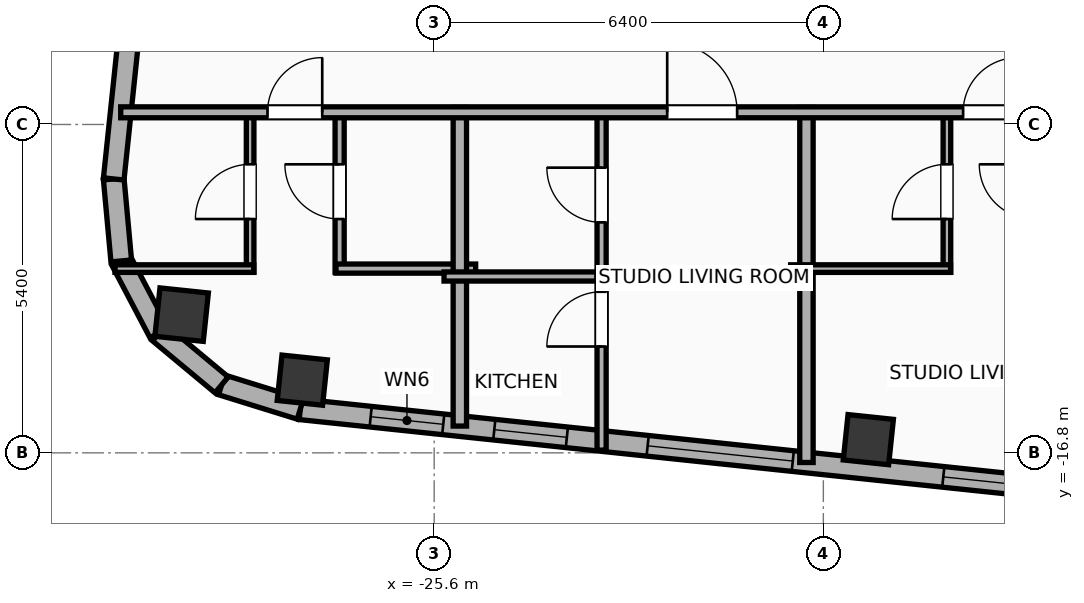
"""IFC4 building model, lengths in metres.
Left out: names, types, materials, properties, quantities, classifications, styles, units other than length and angle.
Written with IfcOpenShell. Run it as: python <this file> out.ifc"""

import sys

from ifc_helpers import new_model, si_unit, direction, frame, frame_2d, origin, origin_2d, place, context, subcontext, project, spatial, rectangle, hollow_rectangle, hollow_circle, extrude, element, fill, save


model = new_model("IFC4")
c1 = context("Model", 3, precision=1e-05, world=origin(), true_north=direction((0.0, 1.0)))
c2 = subcontext(c1, "Body", "Model", "MODEL_VIEW")
j1 = project(units=[si_unit("LENGTHUNIT", "METRE"), si_unit("PLANEANGLEUNIT", "RADIAN")], contexts=[c1])
p1 = place(None, origin())
s1 = spatial("IfcSite", under=j1, at=p1, CompositionType="ELEMENT")
p2 = place(p1, origin())
s2 = spatial("IfcBuilding", under=s1, at=p2, CompositionType="ELEMENT")
p3 = place(p2, frame((0.0, 0.0, 287.3)))
s3 = spatial("IfcBuildingStorey", under=s2, at=p3, CompositionType="ELEMENT", Elevation=287.3)
for number, where, z_axis, x_axis in (
    (1, (-27.769, -15.604, 0.0), (0.0, 0.0, 1.0), (0.995, -0.105, 0.0)),
    (2, (-18.46, -16.583, 0.0), (0.0, 0.0, 1.0), (0.995, -0.105, 0.0)),
):
    element("IfcColumn", number, at=place(p3, frame(where, z_axis=z_axis, x_axis=x_axis)), inside=s3, PredefinedType="COLUMN", context=c2, shape_type="SweptSolid", body=[
        extrude(hollow_rectangle(XDim=0.75, YDim=0.75, WallThickness=0.025, at=origin_2d()), origin(), (0.0, 0.0, 1.0), 3.9),
    ])
p4 = place(p3, frame((-29.753, -14.527, 0.0), z_axis=(0.0, 0.0, 1.0), x_axis=(0.994521895368, -0.104528463268, 0.0)))
e3 = element("IfcColumn", 3, at=p4, inside=s3, PredefinedType="COLUMN", context=c2, shape_type="SweptSolid", body=[
    extrude(hollow_circle(Radius=0.4, WallThickness=0.028, at=origin_2d()), origin(), (0.0, 0.0, 1.0), 3.9),
])
p5 = place(p3, frame((18.708, -20.972, 0.0), z_axis=(0.0, 0.0, 1.0), x_axis=(-0.994521888554, 0.104528528102, 0.0)))
e4 = element("IfcWall", 4, at=p5, inside=s3, PredefinedType="ELEMENTEDWALL", context=c2, shape_type="SweptSolid", body=[
    extrude(rectangle(XDim=46.766, YDim=0.34, at=frame_2d((23.383, 0.0))), origin(), (0.0, 0.0, 1.0), 3.635),
])
p6 = place(p5, frame((23.833, 0.0, 0.75)))
e5 = element("IfcOpeningElement", 5, at=p6, cuts=e4, PredefinedType="OPENING", context=c2, shape_type="SweptSolid", body=[
    extrude(rectangle(XDim=2.4, YDim=2.1, at=frame_2d((1.2, 1.05))), frame((0.0, 0.18, 0.0), z_axis=(0.0, -1.0, 0.0), x_axis=(1.0, 0.0, 0.0)), (0.0, 0.0, 1.0), 0.36),
])
p7 = place(p5, frame((38.622, 0.0, 0.75)))
e6 = element("IfcOpeningElement", 6, at=p7, cuts=e4, PredefinedType="OPENING", context=c2, shape_type="SweptSolid", body=[
    extrude(rectangle(XDim=2.4, YDim=2.1, at=frame_2d((1.2, 1.05))), frame((0.0, 0.18, 0.0), z_axis=(0.0, -1.0, 0.0), x_axis=(1.0, 0.0, 0.0)), (0.0, 0.0, 1.0), 0.36),
])
p8 = place(p5, frame((44.402, 0.0, 0.75)))
e7 = element("IfcOpeningElement", 7, at=p8, cuts=e4, PredefinedType="OPENING", context=c2, shape_type="SweptSolid", body=[
    extrude(rectangle(XDim=1.2, YDim=2.05, at=frame_2d((0.6, 1.025))), frame((0.0, 0.18, 0.0), z_axis=(0.0, -1.0, 0.0), x_axis=(1.0, 0.0, 0.0)), (0.0, 0.0, 1.0), 0.36),
])
p9 = place(p5, frame((42.358, 0.0, 0.75)))
e8 = element("IfcOpeningElement", 8, at=p9, cuts=e4, PredefinedType="OPENING", context=c2, shape_type="SweptSolid", body=[
    extrude(rectangle(XDim=1.2, YDim=2.05, at=frame_2d((0.6, 1.025))), frame((0.0, 0.18, 0.0), z_axis=(0.0, -1.0, 0.0), x_axis=(1.0, 0.0, 0.0)), (0.0, 0.0, 1.0), 0.36),
])
p10 = place(p5, frame((34.933, 0.0, 0.75)))
e9 = element("IfcOpeningElement", 9, at=p10, cuts=e4, PredefinedType="OPENING", context=c2, shape_type="SweptSolid", body=[
    extrude(rectangle(XDim=1.2, YDim=2.05, at=frame_2d((0.6, 1.025))), frame((0.0, 0.18, 0.0), z_axis=(0.0, -1.0, 0.0), x_axis=(1.0, 0.0, 0.0)), (0.0, 0.0, 1.0), 0.36),
])
p11 = place(p5, frame((28.704, 0.0, 0.75)))
e10 = element("IfcOpeningElement", 10, at=p11, cuts=e4, PredefinedType="OPENING", context=c2, shape_type="SweptSolid", body=[
    extrude(rectangle(XDim=1.2, YDim=2.05, at=frame_2d((0.6, 1.025))), frame((0.0, 0.18, 0.0), z_axis=(0.0, -1.0, 0.0), x_axis=(1.0, 0.0, 0.0)), (0.0, 0.0, 1.0), 0.36),
])
p12 = place(p5, frame((30.849, 0.0, 0.75)))
e11 = element("IfcOpeningElement", 11, at=p12, cuts=e4, PredefinedType="OPENING", context=c2, shape_type="SweptSolid", body=[
    extrude(rectangle(XDim=1.2, YDim=2.05, at=frame_2d((0.6, 1.025))), frame((0.0, 0.18, 0.0), z_axis=(0.0, -1.0, 0.0), x_axis=(1.0, 0.0, 0.0)), (0.0, 0.0, 1.0), 0.36),
])
p13 = place(p5, frame((7.479, 0.0, 0.75)))
e12 = element("IfcOpeningElement", 12, at=p13, cuts=e4, PredefinedType="OPENING", context=c2, shape_type="SweptSolid", body=[
    extrude(rectangle(XDim=1.2, YDim=2.05, at=frame_2d((0.6, 1.025))), frame((0.0, 0.18, 0.0), z_axis=(0.0, -1.0, 0.0), x_axis=(1.0, 0.0, 0.0)), (0.0, 0.0, 1.0), 0.36),
])
p14 = place(p5, frame((3.796, 0.0, 0.75)))
e13 = element("IfcOpeningElement", 13, at=p14, cuts=e4, PredefinedType="OPENING", context=c2, shape_type="SweptSolid", body=[
    extrude(rectangle(XDim=1.2, YDim=2.05, at=frame_2d((0.6, 1.025))), frame((0.0, 0.18, 0.0), z_axis=(0.0, -1.0, 0.0), x_axis=(1.0, 0.0, 0.0)), (0.0, 0.0, 1.0), 0.36),
])
p15 = place(p5, frame((1.388, 0.0, 0.75)))
e14 = element("IfcOpeningElement", 14, at=p15, cuts=e4, PredefinedType="OPENING", context=c2, shape_type="SweptSolid", body=[
    extrude(rectangle(XDim=1.2, YDim=2.05, at=frame_2d((0.6, 1.025))), frame((0.0, 0.18, 0.0), z_axis=(0.0, -1.0, 0.0), x_axis=(1.0, 0.0, 0.0)), (0.0, 0.0, 1.0), 0.36),
])
p16 = place(p5, frame((20.254, 0.0, 0.75)))
e15 = element("IfcOpeningElement", 15, at=p16, cuts=e4, PredefinedType="OPENING", context=c2, shape_type="SweptSolid", body=[
    extrude(rectangle(XDim=1.2, YDim=2.05, at=frame_2d((0.6, 1.025))), frame((0.0, 0.18, 0.0), z_axis=(0.0, -1.0, 0.0), x_axis=(1.0, 0.0, 0.0)), (0.0, 0.0, 1.0), 0.36),
])
p17 = place(p5, frame((16.172, 0.0, 0.75)))
e16 = element("IfcOpeningElement", 16, at=p17, cuts=e4, PredefinedType="OPENING", context=c2, shape_type="SweptSolid", body=[
    extrude(rectangle(XDim=1.2, YDim=2.05, at=frame_2d((0.6, 1.025))), frame((0.0, 0.18, 0.0), z_axis=(0.0, -1.0, 0.0), x_axis=(1.0, 0.0, 0.0)), (0.0, 0.0, 1.0), 0.36),
])
p18 = place(p5, frame((12.11, 0.0, 0.75)))
e17 = element("IfcOpeningElement", 17, at=p18, cuts=e4, PredefinedType="OPENING", context=c2, shape_type="SweptSolid", body=[
    extrude(rectangle(XDim=1.2, YDim=2.05, at=frame_2d((0.6, 1.025))), frame((0.0, 0.18, 0.0), z_axis=(0.0, -1.0, 0.0), x_axis=(1.0, 0.0, 0.0)), (0.0, 0.0, 1.0), 0.36),
])
p19 = place(p3, frame((-27.802, -16.084, 0.0), z_axis=(0.0, 0.0, 1.0), x_axis=(-0.955007802701, 0.296580674994, 0.0)))
e18 = element("IfcWall", 18, at=p19, inside=s3, PredefinedType="ELEMENTEDWALL", context=c2, shape_type="SweptSolid", body=[
    extrude(rectangle(XDim=1.354, YDim=0.34, at=frame_2d((0.677, 0.0))), origin(), (0.0, 0.0, 1.0), 3.635),
])
p20 = place(p3, frame((-29.096, -15.682, 0.0), z_axis=(0.0, 0.0, 1.0), x_axis=(-0.768864427906, 0.639411832469, 0.0)))
e19 = element("IfcWall", 19, at=p20, inside=s3, PredefinedType="ELEMENTEDWALL", context=c2, shape_type="SweptSolid", body=[
    extrude(rectangle(XDim=1.337, YDim=0.34, at=frame_2d((0.668, 0.0))), origin(), (0.0, 0.0, 1.0), 3.635),
])
p21 = place(p3, frame((-30.124, -14.827, 0.0), z_axis=(0.0, 0.0, 1.0), x_axis=(-0.465528132217, 0.885033083062, 0.0)))
e20 = element("IfcWall", 20, at=p21, inside=s3, PredefinedType="ELEMENTEDWALL", context=c2, shape_type="SweptSolid", body=[
    extrude(rectangle(XDim=1.337, YDim=0.34, at=frame_2d((0.668, 0.0))), origin(), (0.0, 0.0, 1.0), 3.635),
])
p22 = place(p3, frame((-30.746, -13.644, 0.0), z_axis=(0.0, 0.0, 1.0), x_axis=(-0.091592370975, 0.995796584438, 0.0)))
e21 = element("IfcWall", 21, at=p22, inside=s3, PredefinedType="ELEMENTEDWALL", context=c2, shape_type="SweptSolid", body=[
    extrude(rectangle(XDim=1.354, YDim=0.34, at=frame_2d((0.677, 0.0))), origin(), (0.0, 0.0, 1.0), 3.635),
])
p23 = place(p3, frame((-30.87, -12.296, 0.0), z_axis=(0.0, 0.0, 1.0), x_axis=(0.104533282919, 0.994521388791, 0.0)))
e22 = element("IfcWall", 22, at=p23, inside=s3, PredefinedType="ELEMENTEDWALL", context=c2, shape_type="SweptSolid", body=[
    extrude(rectangle(XDim=30.366, YDim=0.34, at=frame_2d((15.183, 0.0))), origin(), (0.0, 0.0, 1.0), 3.635),
])
p24 = place(p23, frame((5.842, 0.0, 0.75)))
e23 = element("IfcOpeningElement", 23, at=p24, cuts=e22, PredefinedType="OPENING", context=c2, shape_type="SweptSolid", body=[
    extrude(rectangle(XDim=1.8, YDim=2.1, at=frame_2d((0.9, 1.05))), frame((0.0, 0.18, 0.0), z_axis=(0.0, -1.0, 0.0), x_axis=(1.0, 0.0, 0.0)), (0.0, 0.0, 1.0), 0.36),
])
p25 = place(p23, frame((27.238, 0.0, 0.75)))
e24 = element("IfcOpeningElement", 24, at=p25, cuts=e22, PredefinedType="OPENING", context=c2, shape_type="SweptSolid", body=[
    extrude(rectangle(XDim=1.2, YDim=2.05, at=frame_2d((0.6, 1.025))), frame((0.0, 0.18, 0.0), z_axis=(0.0, -1.0, 0.0), x_axis=(1.0, 0.0, 0.0)), (0.0, 0.0, 1.0), 0.36),
])
p26 = place(p23, frame((16.688, 0.0, 0.75)))
e25 = element("IfcOpeningElement", 25, at=p26, cuts=e22, PredefinedType="OPENING", context=c2, shape_type="SweptSolid", body=[
    extrude(rectangle(XDim=1.2, YDim=2.05, at=frame_2d((0.6, 1.025))), frame((0.0, 0.18, 0.0), z_axis=(0.0, -1.0, 0.0), x_axis=(1.0, 0.0, 0.0)), (0.0, 0.0, 1.0), 0.36),
])
p27 = place(p3, frame((-28.627, -13.83, 0.0), z_axis=(0.0, 0.0, 1.0), x_axis=(0.0, 1.0, 0.0)))
e26 = element("IfcWall", 26, at=p27, inside=s3, PredefinedType="PARTITIONING", context=c2, shape_type="SweptSolid", body=[
    extrude(rectangle(XDim=2.65, YDim=0.125, at=frame_2d((1.325, 0.0))), origin(), (0.0, 0.0, 1.0), 3.635),
])
p28 = place(p27, frame((0.875, 0.0, 0.0)))
e27 = element("IfcOpeningElement", 27, at=p28, cuts=e26, PredefinedType="OPENING", context=c2, shape_type="SweptSolid", body=[
    extrude(rectangle(XDim=0.9, YDim=2.05, at=frame_2d((0.45, 1.025))), frame((0.0, 0.073, 0.0), z_axis=(0.0, -1.0, 0.0), x_axis=(1.0, 0.0, 0.0)), (0.0, 0.0, 1.0), 0.145),
])
p29 = place(p3, frame((-27.155, -13.83, 0.0), z_axis=(0.0, 0.0, 1.0), x_axis=(0.0, 1.0, 0.0)))
e28 = element("IfcWall", 28, at=p29, inside=s3, PredefinedType="PLUMBINGWALL", context=c2, shape_type="SweptSolid", body=[
    extrude(rectangle(XDim=2.65, YDim=0.15, at=frame_2d((1.325, 0.0))), origin(), (0.0, 0.0, 1.0), 3.635),
])
p30 = place(p29, frame((0.875, 0.0, 0.0)))
e29 = element("IfcOpeningElement", 29, at=p30, cuts=e28, PredefinedType="OPENING", context=c2, shape_type="SweptSolid", body=[
    extrude(rectangle(XDim=0.9, YDim=2.05, at=frame_2d((0.45, 1.025))), frame((0.0, 0.085, 0.0), z_axis=(0.0, -1.0, 0.0), x_axis=(1.0, 0.0, 0.0)), (0.0, 0.0, 1.0), 0.17),
])
p31 = place(p3, frame((-30.849, -13.77, 0.0), z_axis=(0.0, 0.0, 1.0), x_axis=(1.0, 0.0, 0.0)))
e30 = element("IfcWall", 30, at=p31, inside=s3, PredefinedType="PARTITIONING", context=c2, shape_type="SweptSolid", body=[
    extrude(rectangle(XDim=2.282, YDim=0.125, at=frame_2d((1.141, 0.0))), origin(), (0.0, 0.0, 1.0), 3.635),
])
p32 = place(p3, frame((-27.215, -13.77, 0.0), z_axis=(0.0, 0.0, 1.0), x_axis=(1.0, 0.0, 0.0)))
e31 = element("IfcWall", 31, at=p32, inside=s3, PredefinedType="PLUMBINGWALL", context=c2, shape_type="SweptSolid", body=[
    extrude(rectangle(XDim=2.297, YDim=0.15, at=frame_2d((1.148, 0.0))), origin(), (0.0, 0.0, 1.0), 3.635),
])
p33 = place(p3, frame((-25.178, -16.36, 0.0), z_axis=(0.0, 0.0, 1.0), x_axis=(0.0, 1.0, 0.0)))
e32 = element("IfcWall", 32, at=p33, inside=s3, PredefinedType="PARTITIONING", context=c2, shape_type="SweptSolid", body=[
    extrude(rectangle(XDim=5.24, YDim=0.22, at=frame_2d((2.62, 0.0))), origin(), (0.0, 0.0, 1.0), 3.635),
])
p34 = place(p3, frame((-25.438, -13.9, 0.0), z_axis=(0.0, 0.0, 1.0), x_axis=(1.0, 0.0, 0.0)))
e33 = element("IfcWall", 33, at=p34, inside=s3, PredefinedType="PLUMBINGWALL", context=c2, shape_type="SweptSolid", body=[
    extrude(rectangle(XDim=2.671, YDim=0.15, at=frame_2d((1.335, 0.0))), origin(), (0.0, 0.0, 1.0), 3.635),
])
p35 = place(p3, frame((-22.847, -16.755, 0.0), z_axis=(0.0, 0.0, 1.0), x_axis=(0.0, 1.0, 0.0)))
e34 = element("IfcWall", 34, at=p35, inside=s3, PredefinedType="PLUMBINGWALL", context=c2, shape_type="SweptSolid", body=[
    extrude(rectangle(XDim=2.895, YDim=0.15, at=frame_2d((1.448, 0.0))), origin(), (0.0, 0.0, 1.0), 3.635),
])
p36 = place(p35, frame((1.704, 0.0, 0.0)))
e35 = element("IfcOpeningElement", 35, at=p36, cuts=e34, PredefinedType="OPENING", context=c2, shape_type="SweptSolid", body=[
    extrude(rectangle(XDim=0.9, YDim=2.05, at=frame_2d((0.45, 1.025))), frame((0.0, 0.085, 0.0), z_axis=(0.0, -1.0, 0.0), x_axis=(1.0, 0.0, 0.0)), (0.0, 0.0, 1.0), 0.17),
])
p37 = place(p3, frame((-22.847, -13.94, 0.0), z_axis=(0.0, 0.0, 1.0), x_axis=(0.0, 1.0, 0.0)))
e36 = element("IfcWall", 36, at=p37, inside=s3, PredefinedType="PLUMBINGWALL", context=c2, shape_type="SweptSolid", body=[
    extrude(rectangle(XDim=2.76, YDim=0.15, at=frame_2d((1.38, 0.0))), origin(), (0.0, 0.0, 1.0), 3.635),
])
p38 = place(p37, frame((0.93, 0.0, 0.0)))
e37 = element("IfcOpeningElement", 37, at=p38, cuts=e36, PredefinedType="OPENING", context=c2, shape_type="SweptSolid", body=[
    extrude(rectangle(XDim=0.9, YDim=2.05, at=frame_2d((0.45, 1.025))), frame((0.0, 0.085, 0.0), z_axis=(0.0, -1.0, 0.0), x_axis=(1.0, 0.0, 0.0)), (0.0, 0.0, 1.0), 0.17),
])
p39 = place(p3, frame((-19.478, -16.959, 0.0), z_axis=(0.0, 0.0, 1.0), x_axis=(0.0, 1.0, 0.0)))
e38 = element("IfcWall", 38, at=p39, inside=s3, PredefinedType="PARTITIONING", context=c2, shape_type="SweptSolid", body=[
    extrude(rectangle(XDim=5.839, YDim=0.22, at=frame_2d((2.919, 0.0))), origin(), (0.0, 0.0, 1.0), 3.635),
])
p40 = place(p3, frame((-17.168, -13.83, 0.0), z_axis=(0.0, 0.0, 1.0), x_axis=(0.0, 1.0, 0.0)))
e39 = element("IfcWall", 39, at=p40, inside=s3, PredefinedType="PARTITIONING", context=c2, shape_type="SweptSolid", body=[
    extrude(rectangle(XDim=2.65, YDim=0.125, at=frame_2d((1.325, 0.0))), origin(), (0.0, 0.0, 1.0), 3.635),
])
p41 = place(p40, frame((0.875, 0.0, 0.0)))
e40 = element("IfcOpeningElement", 40, at=p41, cuts=e39, PredefinedType="OPENING", context=c2, shape_type="SweptSolid", body=[
    extrude(rectangle(XDim=0.9, YDim=2.05, at=frame_2d((0.45, 1.025))), frame((0.0, 0.073, 0.0), z_axis=(0.0, -1.0, 0.0), x_axis=(1.0, 0.0, 0.0)), (0.0, 0.0, 1.0), 0.145),
])
p42 = place(p3, frame((-19.738, -13.77, 0.0), z_axis=(0.0, 0.0, 1.0), x_axis=(1.0, 0.0, 0.0)))
e41 = element("IfcWall", 41, at=p42, inside=s3, PredefinedType="PARTITIONING", context=c2, shape_type="SweptSolid", body=[
    extrude(rectangle(XDim=2.63, YDim=0.125, at=frame_2d((1.315, 0.0))), origin(), (0.0, 0.0, 1.0), 3.635),
])
p43 = place(p3, frame((-30.755, -11.2, 0.0), z_axis=(0.0, 0.0, 1.0), x_axis=(1.0, 0.0, 0.0)))
e42 = element("IfcWall", 42, at=p43, inside=s3, PredefinedType="PARTITIONING", context=c2, shape_type="SweptSolid", body=[
    extrude(rectangle(XDim=22.675, YDim=0.18, at=frame_2d((11.337, 0.0))), origin(), (0.0, 0.0, 1.0), 3.635),
])
p44 = place(p43, frame((2.414, 0.0, 0.0)))
e43 = element("IfcOpeningElement", 43, at=p44, cuts=e42, PredefinedType="OPENING", context=c2, shape_type="SweptSolid", body=[
    extrude(rectangle(XDim=0.9, YDim=2.05, at=frame_2d((0.45, 1.025))), frame((0.0, 0.1, 0.0), z_axis=(0.0, -1.0, 0.0), x_axis=(1.0, 0.0, 0.0)), (0.0, 0.0, 1.0), 0.2),
])
p45 = place(p43, frame((8.987, 0.0, 0.0)))
e44 = element("IfcOpeningElement", 44, at=p45, cuts=e42, PredefinedType="OPENING", context=c2, shape_type="SweptSolid", body=[
    extrude(rectangle(XDim=1.15, YDim=2.05, at=frame_2d((0.575, 1.025))), frame((0.0, 0.1, 0.0), z_axis=(0.0, -1.0, 0.0), x_axis=(1.0, 0.0, 0.0)), (0.0, 0.0, 1.0), 0.2),
])
p46 = place(p43, frame((13.854, 0.0, 0.0)))
e45 = element("IfcOpeningElement", 45, at=p46, cuts=e42, PredefinedType="OPENING", context=c2, shape_type="SweptSolid", body=[
    extrude(rectangle(XDim=0.9, YDim=2.05, at=frame_2d((0.45, 1.025))), frame((0.0, 0.1, 0.0), z_axis=(0.0, -1.0, 0.0), x_axis=(1.0, 0.0, 0.0)), (0.0, 0.0, 1.0), 0.2),
])
p47 = place(p43, frame((20.433, 0.0, 0.0)))
e46 = element("IfcOpeningElement", 46, at=p47, cuts=e42, PredefinedType="OPENING", context=c2, shape_type="SweptSolid", body=[
    extrude(rectangle(XDim=1.15, YDim=2.05, at=frame_2d((0.575, 1.025))), frame((0.0, 0.1, 0.0), z_axis=(0.0, -1.0, 0.0), x_axis=(1.0, 0.0, 0.0)), (0.0, 0.0, 1.0), 0.2),
])
p48 = place(p7, origin())
e47 = element("IfcWindow", 47, at=p48, inside=s3, PartitioningType="SINGLE_PANEL", PredefinedType="WINDOW", context=c2, shape_type="SweptSolid", body=[
    extrude(rectangle(XDim=2.4, YDim=2.1, at=frame_2d((1.2, 1.05))), frame((0.0, 0.03, 0.0), z_axis=(0.0, -1.0, 0.0), x_axis=(1.0, 0.0, 0.0)), (0.0, 0.0, 1.0), 0.06),
])
fill(e6, e47)
p49 = place(p8, origin())
e48 = element("IfcWindow", 48, at=p49, inside=s3, PartitioningType="SINGLE_PANEL", PredefinedType="WINDOW", context=c2, shape_type="SweptSolid", body=[
    extrude(rectangle(XDim=1.2, YDim=2.05, at=frame_2d((0.6, 1.025))), frame((0.0, 0.03, 0.0), z_axis=(0.0, -1.0, 0.0), x_axis=(1.0, 0.0, 0.0)), (0.0, 0.0, 1.0), 0.06),
])
fill(e7, e48)
p50 = place(p9, origin())
e49 = element("IfcWindow", 49, at=p50, inside=s3, PartitioningType="SINGLE_PANEL", PredefinedType="WINDOW", context=c2, shape_type="SweptSolid", body=[
    extrude(rectangle(XDim=1.2, YDim=2.05, at=frame_2d((0.6, 1.025))), frame((0.0, 0.03, 0.0), z_axis=(0.0, -1.0, 0.0), x_axis=(1.0, 0.0, 0.0)), (0.0, 0.0, 1.0), 0.06),
])
fill(e8, e49)
p51 = place(p10, origin())
e50 = element("IfcWindow", 50, at=p51, inside=s3, PartitioningType="SINGLE_PANEL", PredefinedType="WINDOW", context=c2, shape_type="SweptSolid", body=[
    extrude(rectangle(XDim=1.2, YDim=2.05, at=frame_2d((0.6, 1.025))), frame((0.0, 0.03, 0.0), z_axis=(0.0, -1.0, 0.0), x_axis=(1.0, 0.0, 0.0)), (0.0, 0.0, 1.0), 0.06),
])
fill(e9, e50)
p52 = place(p28, origin())
e51 = element("IfcDoor", 51, at=p52, inside=s3, OperationType="SINGLE_SWING_LEFT", PredefinedType="DOOR", context=c2, shape_type="SweptSolid", body=[
    extrude(rectangle(XDim=0.9, YDim=2.05, at=frame_2d((0.45, 1.025))), frame((0.0, 0.025, 0.0), z_axis=(0.0, -1.0, 0.0), x_axis=(1.0, 0.0, 0.0)), (0.0, 0.0, 1.0), 0.05),
])
fill(e27, e51)
p53 = place(p30, origin())
e52 = element("IfcDoor", 52, at=p53, inside=s3, OperationType="SINGLE_SWING_RIGHT", PredefinedType="DOOR", context=c2, shape_type="SweptSolid", body=[
    extrude(rectangle(XDim=0.9, YDim=2.05, at=frame_2d((0.45, 1.025))), frame((0.0, 0.025, 0.0), z_axis=(0.0, -1.0, 0.0), x_axis=(1.0, 0.0, 0.0)), (0.0, 0.0, 1.0), 0.05),
])
fill(e29, e52)
p54 = place(p36, origin())
e53 = element("IfcDoor", 53, at=p54, inside=s3, OperationType="SINGLE_SWING_LEFT", PredefinedType="DOOR", context=c2, shape_type="SweptSolid", body=[
    extrude(rectangle(XDim=0.9, YDim=2.05, at=frame_2d((0.45, 1.025))), frame((0.0, 0.025, 0.0), z_axis=(0.0, -1.0, 0.0), x_axis=(1.0, 0.0, 0.0)), (0.0, 0.0, 1.0), 0.05),
])
fill(e35, e53)
p55 = place(p38, origin())
e54 = element("IfcDoor", 54, at=p55, inside=s3, OperationType="SINGLE_SWING_RIGHT", PredefinedType="DOOR", context=c2, shape_type="SweptSolid", body=[
    extrude(rectangle(XDim=0.9, YDim=2.05, at=frame_2d((0.45, 1.025))), frame((0.0, 0.025, 0.0), z_axis=(0.0, -1.0, 0.0), x_axis=(1.0, 0.0, 0.0)), (0.0, 0.0, 1.0), 0.05),
])
fill(e37, e54)
p56 = place(p41, origin())
e55 = element("IfcDoor", 55, at=p56, inside=s3, OperationType="SINGLE_SWING_LEFT", PredefinedType="DOOR", context=c2, shape_type="SweptSolid", body=[
    extrude(rectangle(XDim=0.9, YDim=2.05, at=frame_2d((0.45, 1.025))), frame((0.0, 0.025, 0.0), z_axis=(0.0, -1.0, 0.0), x_axis=(1.0, 0.0, 0.0)), (0.0, 0.0, 1.0), 0.05),
])
fill(e40, e55)
p57 = place(p44, origin())
e56 = element("IfcDoor", 56, at=p57, inside=s3, OperationType="SINGLE_SWING_RIGHT", PredefinedType="DOOR", context=c2, shape_type="SweptSolid", body=[
    extrude(rectangle(XDim=0.9, YDim=2.05, at=frame_2d((0.45, 1.025))), frame((0.0, 0.025, 0.0), z_axis=(0.0, -1.0, 0.0), x_axis=(1.0, 0.0, 0.0)), (0.0, 0.0, 1.0), 0.05),
])
fill(e43, e56)
p58 = place(p45, origin())
e57 = element("IfcDoor", 57, at=p58, inside=s3, OperationType="SINGLE_SWING_LEFT", PredefinedType="DOOR", context=c2, shape_type="SweptSolid", body=[
    extrude(rectangle(XDim=1.15, YDim=2.05, at=frame_2d((0.575, 1.025))), frame((0.0, 0.025, 0.0), z_axis=(0.0, -1.0, 0.0), x_axis=(1.0, 0.0, 0.0)), (0.0, 0.0, 1.0), 0.05),
])
fill(e44, e57)
p59 = place(p46, origin())
e58 = element("IfcDoor", 58, at=p59, inside=s3, OperationType="SINGLE_SWING_RIGHT", PredefinedType="DOOR", context=c2, shape_type="SweptSolid", body=[
    extrude(rectangle(XDim=0.9, YDim=2.05, at=frame_2d((0.45, 1.025))), frame((0.0, 0.025, 0.0), z_axis=(0.0, -1.0, 0.0), x_axis=(1.0, 0.0, 0.0)), (0.0, 0.0, 1.0), 0.05),
])
fill(e45, e58)
save(model, sys.argv[1])
